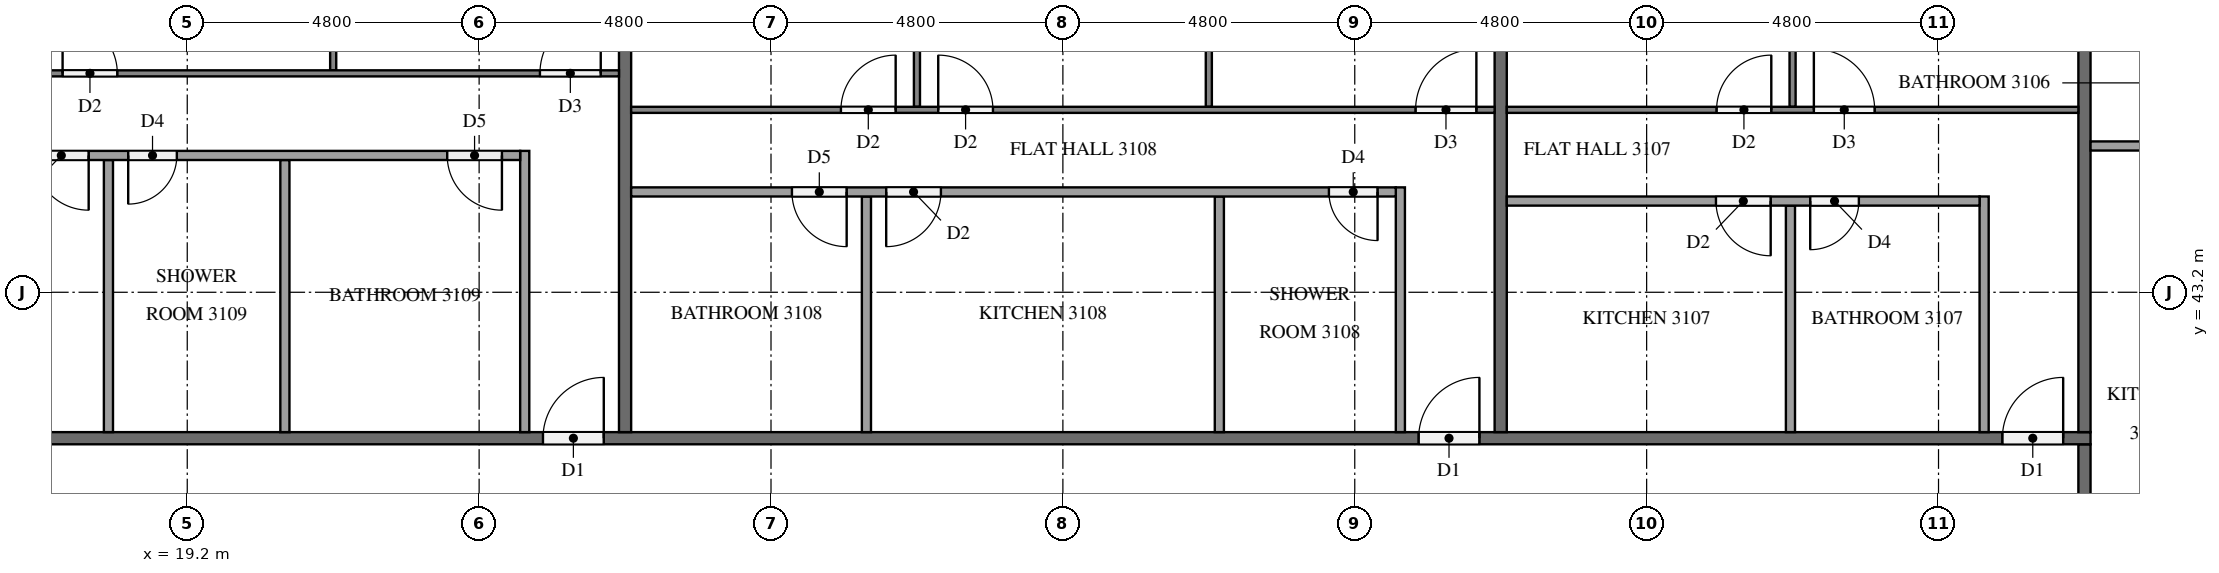
"""IFC4 building model, lengths in metres.
Left out: names, types, materials, properties, quantities, classifications, styles, units other than length and angle.
Written with IfcOpenShell. Run it as: python <this file> out.ifc"""

import sys

from ifc_helpers import new_model, si_unit, direction, frame, frame_2d, origin, place, context, subcontext, project, spatial, rectangle, extrude, element, fill, save


model = new_model("IFC4")
c1 = context("Model", 3, precision=1e-05, world=origin(), true_north=direction((0.0, 1.0)))
c2 = subcontext(c1, "Body", "Model", "MODEL_VIEW")
j1 = project(units=[si_unit("LENGTHUNIT", "METRE"), si_unit("PLANEANGLEUNIT", "RADIAN")], contexts=[c1])
p1 = place(None, origin())
s1 = spatial("IfcSite", under=j1, at=p1, CompositionType="ELEMENT")
p2 = place(p1, origin())
s2 = spatial("IfcBuilding", under=s1, at=p2, CompositionType="ELEMENT")
p3 = place(p2, frame((0.0, 0.0, 122.6)))
s3 = spatial("IfcBuildingStorey", under=s2, at=p3, CompositionType="ELEMENT", Elevation=122.6)
p4 = place(p3, frame((50.4, 40.7, 0.0), z_axis=(0.0, 0.0, 1.0), x_axis=(0.0, -1.0, 0.0)))
e1 = element("IfcWall", 1, at=p4, inside=s3, PredefinedType="PARTITIONING", context=c2, shape_type="SweptSolid", body=[
    extrude(rectangle(XDim=2.8, YDim=0.2, at=frame_2d((1.4, 0.0))), origin(), (0.0, 0.0, 1.0), 3.2),
])
p5 = place(p4, frame((1.55, 0.0, 0.0)))
e2 = element("IfcOpeningElement", 2, at=p5, cuts=e1, PredefinedType="OPENING", context=c2, shape_type="SweptSolid", body=[
    extrude(rectangle(XDim=1.0, YDim=2.1, at=frame_2d((0.5, 1.05))), frame((0.0, 0.11, 0.0), z_axis=(0.0, -1.0, 0.0), x_axis=(1.0, 0.0, 0.0)), (0.0, 0.0, 1.0), 0.22),
])
p6 = place(p3, frame((11.9, 40.8, 0.0), z_axis=(0.0, 0.0, 1.0), x_axis=(1.0, 0.0, 0.0)))
e3 = element("IfcWall", 3, at=p6, inside=s3, PredefinedType="PARTITIONING", context=c2, shape_type="SweptSolid", body=[
    extrude(rectangle(XDim=38.6, YDim=0.2, at=frame_2d((19.3, 0.0))), origin(), (0.0, 0.0, 1.0), 3.2),
])
p7 = place(p6, frame((37.15, 0.0, 0.0)))
e4 = element("IfcOpeningElement", 4, at=p7, cuts=e3, PredefinedType="OPENING", context=c2, shape_type="SweptSolid", body=[
    extrude(rectangle(XDim=1.0, YDim=2.1, at=frame_2d((0.5, 1.05))), frame((0.0, 0.11, 0.0), z_axis=(0.0, -1.0, 0.0), x_axis=(1.0, 0.0, 0.0)), (0.0, 0.0, 1.0), 0.22),
])
p8 = place(p6, frame((27.55, 0.0, 0.0)))
e5 = element("IfcOpeningElement", 5, at=p8, cuts=e3, PredefinedType="OPENING", context=c2, shape_type="SweptSolid", body=[
    extrude(rectangle(XDim=1.0, YDim=2.1, at=frame_2d((0.5, 1.05))), frame((0.0, 0.11, 0.0), z_axis=(0.0, -1.0, 0.0), x_axis=(1.0, 0.0, 0.0)), (0.0, 0.0, 1.0), 0.22),
])
p9 = place(p6, frame((13.15, 0.0, 0.0)))
e6 = element("IfcOpeningElement", 6, at=p9, cuts=e3, PredefinedType="OPENING", context=c2, shape_type="SweptSolid", body=[
    extrude(rectangle(XDim=1.0, YDim=2.1, at=frame_2d((0.5, 1.05))), frame((0.0, 0.11, 0.0), z_axis=(0.0, -1.0, 0.0), x_axis=(1.0, 0.0, 0.0)), (0.0, 0.0, 1.0), 0.22),
])
for number, where, z_axis, x_axis in (
    (7, (50.4, 40.9, 0.0), (0.0, 0.0, 1.0), (0.0, 1.0, 0.0)),
    (8, (40.8, 52.7, 0.0), (0.0, 0.0, 1.0), (0.0, -1.0, 0.0)),
    (9, (26.4, 52.7, 0.0), (0.0, 0.0, 1.0), (0.0, -1.0, 0.0)),
):
    element("IfcWall", number, at=place(p3, frame(where, z_axis=z_axis, x_axis=x_axis)), inside=s3, PredefinedType="PARTITIONING", context=c2, shape_type="SweptSolid", body=[
        extrude(rectangle(XDim=11.8, YDim=0.2, at=frame_2d((5.9, 0.0))), origin(), (0.0, 0.0, 1.0), 3.2),
    ])
p10 = place(p3, frame((50.5, 45.606, 0.0), z_axis=(0.0, 0.0, 1.0), x_axis=(1.0, 0.0, 0.0)))
e10 = element("IfcWall", 10, at=p10, inside=s3, PredefinedType="PARTITIONING", context=c2, shape_type="SweptSolid", body=[
    extrude(rectangle(XDim=1.925, YDim=0.15, at=frame_2d((0.962, 0.0))), origin(), (0.0, 0.0, 1.0), 3.2),
])
p11 = place(p3, frame((45.6, 46.25, 0.0), z_axis=(0.0, 0.0, 1.0), x_axis=(0.0, 1.0, 0.0)))
e11 = element("IfcWall", 11, at=p11, inside=s3, PredefinedType="PARTITIONING", context=c2, shape_type="SweptSolid", body=[
    extrude(rectangle(XDim=6.45, YDim=0.1, at=frame_2d((3.225, 0.0))), origin(), (0.0, 0.0, 1.0), 3.2),
])
p12 = place(p3, frame((40.9, 46.2, 0.0), z_axis=(0.0, 0.0, 1.0), x_axis=(1.0, 0.0, 0.0)))
e12 = element("IfcWall", 12, at=p12, inside=s3, PredefinedType="PARTITIONING", context=c2, shape_type="SweptSolid", body=[
    extrude(rectangle(XDim=9.4, YDim=0.1, at=frame_2d((4.7, 0.0))), origin(), (0.0, 0.0, 1.0), 3.2),
])
p13 = place(p12, frame((5.05, 0.0, 0.0)))
e13 = element("IfcOpeningElement", 13, at=p13, cuts=e12, PredefinedType="OPENING", context=c2, shape_type="SweptSolid", body=[
    extrude(rectangle(XDim=1.0, YDim=2.1, at=frame_2d((0.5, 1.05))), frame((0.0, 0.06, 0.0), z_axis=(0.0, -1.0, 0.0), x_axis=(1.0, 0.0, 0.0)), (0.0, 0.0, 1.0), 0.12),
])
p14 = place(p12, frame((3.45, 0.0, 0.0)))
e14 = element("IfcOpeningElement", 14, at=p14, cuts=e12, PredefinedType="OPENING", context=c2, shape_type="SweptSolid", body=[
    extrude(rectangle(XDim=0.9, YDim=2.1, at=frame_2d((0.45, 1.05))), frame((0.0, 0.06, 0.0), z_axis=(0.0, -1.0, 0.0), x_axis=(1.0, 0.0, 0.0)), (0.0, 0.0, 1.0), 0.12),
])
p15 = place(p3, frame((45.565, 40.9, 0.0), z_axis=(0.0, 0.0, 1.0), x_axis=(0.0, 1.0, 0.0)))
e15 = element("IfcWall", 15, at=p15, inside=s3, PredefinedType="PARTITIONING", context=c2, shape_type="SweptSolid", body=[
    extrude(rectangle(XDim=3.725, YDim=0.15, at=frame_2d((1.863, 0.0))), origin(), (0.0, 0.0, 1.0), 3.2),
])
p16 = place(p3, frame((48.75, 40.9, 0.0), z_axis=(0.0, 0.0, 1.0), x_axis=(0.0, 1.0, 0.0)))
e16 = element("IfcWall", 16, at=p16, inside=s3, PredefinedType="PARTITIONING", context=c2, shape_type="SweptSolid", body=[
    extrude(rectangle(XDim=3.875, YDim=0.15, at=frame_2d((1.938, 0.0))), origin(), (0.0, 0.0, 1.0), 3.2),
])
p17 = place(p3, frame((48.675, 44.7, 0.0), z_axis=(0.0, 0.0, 1.0), x_axis=(-1.0, 0.0, 0.0)))
e17 = element("IfcWall", 17, at=p17, inside=s3, PredefinedType="PARTITIONING", context=c2, shape_type="SweptSolid", body=[
    extrude(rectangle(XDim=7.775, YDim=0.15, at=frame_2d((3.888, 0.0))), origin(), (0.0, 0.0, 1.0), 3.2),
])
p18 = place(p17, frame((1.985, 0.0, 0.0)))
e18 = element("IfcOpeningElement", 18, at=p18, cuts=e17, PredefinedType="OPENING", context=c2, shape_type="SweptSolid", body=[
    extrude(rectangle(XDim=0.8, YDim=2.1, at=frame_2d((0.4, 1.05))), frame((0.0, 0.085, 0.0), z_axis=(0.0, -1.0, 0.0), x_axis=(1.0, 0.0, 0.0)), (0.0, 0.0, 1.0), 0.17),
])
p19 = place(p17, frame((3.435, 0.0, 0.0)))
e19 = element("IfcOpeningElement", 19, at=p19, cuts=e17, PredefinedType="OPENING", context=c2, shape_type="SweptSolid", body=[
    extrude(rectangle(XDim=0.9, YDim=2.1, at=frame_2d((0.45, 1.05))), frame((0.0, 0.085, 0.0), z_axis=(0.0, -1.0, 0.0), x_axis=(1.0, 0.0, 0.0)), (0.0, 0.0, 1.0), 0.17),
])
for number, where, z_axis, x_axis in (
    (20, (36.0, 46.25, 0.0), (0.0, 0.0, 1.0), (0.0, 1.0, 0.0)),
    (21, (31.2, 46.25, 0.0), (0.0, 0.0, 1.0), (0.0, 1.0, 0.0)),
):
    element("IfcWall", number, at=place(p3, frame(where, z_axis=z_axis, x_axis=x_axis)), inside=s3, PredefinedType="PARTITIONING", context=c2, shape_type="SweptSolid", body=[
        extrude(rectangle(XDim=6.45, YDim=0.1, at=frame_2d((3.225, 0.0))), origin(), (0.0, 0.0, 1.0), 3.2),
    ])
p20 = place(p3, frame((26.5, 46.2, 0.0), z_axis=(0.0, 0.0, 1.0), x_axis=(1.0, 0.0, 0.0)))
e22 = element("IfcWall", 22, at=p20, inside=s3, PredefinedType="PARTITIONING", context=c2, shape_type="SweptSolid", body=[
    extrude(rectangle(XDim=14.2, YDim=0.1, at=frame_2d((7.1, 0.0))), origin(), (0.0, 0.0, 1.0), 3.2),
])
p21 = place(p20, frame((12.9, 0.0, 0.0)))
e23 = element("IfcOpeningElement", 23, at=p21, cuts=e22, PredefinedType="OPENING", context=c2, shape_type="SweptSolid", body=[
    extrude(rectangle(XDim=1.0, YDim=2.1, at=frame_2d((0.5, 1.05))), frame((0.0, 0.06, 0.0), z_axis=(0.0, -1.0, 0.0), x_axis=(1.0, 0.0, 0.0)), (0.0, 0.0, 1.0), 0.12),
])
p22 = place(p20, frame((5.05, 0.0, 0.0)))
e24 = element("IfcOpeningElement", 24, at=p22, cuts=e22, PredefinedType="OPENING", context=c2, shape_type="SweptSolid", body=[
    extrude(rectangle(XDim=0.9, YDim=2.1, at=frame_2d((0.45, 1.05))), frame((0.0, 0.06, 0.0), z_axis=(0.0, -1.0, 0.0), x_axis=(1.0, 0.0, 0.0)), (0.0, 0.0, 1.0), 0.12),
])
p23 = place(p20, frame((3.45, 0.0, 0.0)))
e25 = element("IfcOpeningElement", 25, at=p23, cuts=e22, PredefinedType="OPENING", context=c2, shape_type="SweptSolid", body=[
    extrude(rectangle(XDim=0.9, YDim=2.1, at=frame_2d((0.45, 1.05))), frame((0.0, 0.06, 0.0), z_axis=(0.0, -1.0, 0.0), x_axis=(1.0, 0.0, 0.0)), (0.0, 0.0, 1.0), 0.12),
])
for number, where, z_axis, x_axis in (
    (26, (36.173, 40.9, 0.0), (0.0, 0.0, 1.0), (0.0, 1.0, 0.0)),
    (27, (30.369, 40.9, 0.0), (0.0, 0.0, 1.0), (0.0, 1.0, 0.0)),
):
    element("IfcWall", number, at=place(p3, frame(where, z_axis=z_axis, x_axis=x_axis)), inside=s3, PredefinedType="PARTITIONING", context=c2, shape_type="SweptSolid", body=[
        extrude(rectangle(XDim=3.875, YDim=0.15, at=frame_2d((1.938, 0.0))), origin(), (0.0, 0.0, 1.0), 3.2),
    ])
p24 = place(p3, frame((39.15, 40.9, 0.0), z_axis=(0.0, 0.0, 1.0), x_axis=(0.0, 1.0, 0.0)))
e28 = element("IfcWall", 28, at=p24, inside=s3, PredefinedType="PARTITIONING", context=c2, shape_type="SweptSolid", body=[
    extrude(rectangle(XDim=4.025, YDim=0.15, at=frame_2d((2.013, 0.0))), origin(), (0.0, 0.0, 1.0), 3.2),
])
p25 = place(p3, frame((39.075, 44.85, 0.0), z_axis=(0.0, 0.0, 1.0), x_axis=(-1.0, 0.0, 0.0)))
e29 = element("IfcWall", 29, at=p25, inside=s3, PredefinedType="PARTITIONING", context=c2, shape_type="SweptSolid", body=[
    extrude(rectangle(XDim=12.575, YDim=0.15, at=frame_2d((6.288, 0.0))), origin(), (0.0, 0.0, 1.0), 3.2),
])
p26 = place(p25, frame((0.3, 0.0, 0.0)))
e30 = element("IfcOpeningElement", 30, at=p26, cuts=e29, PredefinedType="OPENING", context=c2, shape_type="SweptSolid", body=[
    extrude(rectangle(XDim=0.8, YDim=2.1, at=frame_2d((0.4, 1.05))), frame((0.0, 0.085, 0.0), z_axis=(0.0, -1.0, 0.0), x_axis=(1.0, 0.0, 0.0)), (0.0, 0.0, 1.0), 0.17),
])
p27 = place(p25, frame((7.481, 0.0, 0.0)))
e31 = element("IfcOpeningElement", 31, at=p27, cuts=e29, PredefinedType="OPENING", context=c2, shape_type="SweptSolid", body=[
    extrude(rectangle(XDim=0.9, YDim=2.1, at=frame_2d((0.45, 1.05))), frame((0.0, 0.085, 0.0), z_axis=(0.0, -1.0, 0.0), x_axis=(1.0, 0.0, 0.0)), (0.0, 0.0, 1.0), 0.17),
])
p28 = place(p25, frame((9.031, 0.0, 0.0)))
e32 = element("IfcOpeningElement", 32, at=p28, cuts=e29, PredefinedType="OPENING", context=c2, shape_type="SweptSolid", body=[
    extrude(rectangle(XDim=0.9, YDim=2.1, at=frame_2d((0.45, 1.05))), frame((0.0, 0.085, 0.0), z_axis=(0.0, -1.0, 0.0), x_axis=(1.0, 0.0, 0.0)), (0.0, 0.0, 1.0), 0.17),
])
p29 = place(p3, frame((21.6, 46.85, 0.0), z_axis=(0.0, 0.0, 1.0), x_axis=(0.0, 1.0, 0.0)))
e33 = element("IfcWall", 33, at=p29, inside=s3, PredefinedType="PARTITIONING", context=c2, shape_type="SweptSolid", body=[
    extrude(rectangle(XDim=5.85, YDim=0.1, at=frame_2d((2.925, 0.0))), origin(), (0.0, 0.0, 1.0), 3.2),
])
p30 = place(p3, frame((12.1, 46.8, 0.0), z_axis=(0.0, 0.0, 1.0), x_axis=(1.0, 0.0, 0.0)))
e34 = element("IfcWall", 34, at=p30, inside=s3, PredefinedType="PARTITIONING", context=c2, shape_type="SweptSolid", body=[
    extrude(rectangle(XDim=14.2, YDim=0.1, at=frame_2d((7.1, 0.0))), origin(), (0.0, 0.0, 1.0), 3.2),
])
p31 = place(p30, frame((12.9, 0.0, 0.0)))
e35 = element("IfcOpeningElement", 35, at=p31, cuts=e34, PredefinedType="OPENING", context=c2, shape_type="SweptSolid", body=[
    extrude(rectangle(XDim=1.0, YDim=2.1, at=frame_2d((0.5, 1.05))), frame((0.0, 0.06, 0.0), z_axis=(0.0, -1.0, 0.0), x_axis=(1.0, 0.0, 0.0)), (0.0, 0.0, 1.0), 0.12),
])
p32 = place(p30, frame((5.05, 0.0, 0.0)))
e36 = element("IfcOpeningElement", 36, at=p32, cuts=e34, PredefinedType="OPENING", context=c2, shape_type="SweptSolid", body=[
    extrude(rectangle(XDim=0.9, YDim=2.1, at=frame_2d((0.45, 1.05))), frame((0.0, 0.06, 0.0), z_axis=(0.0, -1.0, 0.0), x_axis=(1.0, 0.0, 0.0)), (0.0, 0.0, 1.0), 0.12),
])
p33 = place(p30, frame((3.45, 0.0, 0.0)))
e37 = element("IfcOpeningElement", 37, at=p33, cuts=e34, PredefinedType="OPENING", context=c2, shape_type="SweptSolid", body=[
    extrude(rectangle(XDim=0.9, YDim=2.1, at=frame_2d((0.45, 1.05))), frame((0.0, 0.06, 0.0), z_axis=(0.0, -1.0, 0.0), x_axis=(1.0, 0.0, 0.0)), (0.0, 0.0, 1.0), 0.12),
])
for number, where, z_axis, x_axis in (
    (38, (20.806, 40.9, 0.0), (0.0, 0.0, 1.0), (0.0, 1.0, 0.0)),
    (39, (17.904, 40.9, 0.0), (0.0, 0.0, 1.0), (0.0, 1.0, 0.0)),
):
    element("IfcWall", number, at=place(p3, frame(where, z_axis=z_axis, x_axis=x_axis)), inside=s3, PredefinedType="PARTITIONING", context=c2, shape_type="SweptSolid", body=[
        extrude(rectangle(XDim=4.475, YDim=0.15, at=frame_2d((2.238, 0.0))), origin(), (0.0, 0.0, 1.0), 3.2),
    ])
p34 = place(p3, frame((24.75, 40.9, 0.0), z_axis=(0.0, 0.0, 1.0), x_axis=(0.0, 1.0, 0.0)))
e40 = element("IfcWall", 40, at=p34, inside=s3, PredefinedType="PARTITIONING", context=c2, shape_type="SweptSolid", body=[
    extrude(rectangle(XDim=4.625, YDim=0.15, at=frame_2d((2.312, 0.0))), origin(), (0.0, 0.0, 1.0), 3.2),
])
p35 = place(p3, frame((24.675, 45.45, 0.0), z_axis=(0.0, 0.0, 1.0), x_axis=(-1.0, 0.0, 0.0)))
e41 = element("IfcWall", 41, at=p35, inside=s3, PredefinedType="PARTITIONING", context=c2, shape_type="SweptSolid", body=[
    extrude(rectangle(XDim=12.575, YDim=0.15, at=frame_2d((6.288, 0.0))), origin(), (0.0, 0.0, 1.0), 3.2),
])
p36 = place(p35, frame((0.3, 0.0, 0.0)))
e42 = element("IfcOpeningElement", 42, at=p36, cuts=e41, PredefinedType="OPENING", context=c2, shape_type="SweptSolid", body=[
    extrude(rectangle(XDim=0.9, YDim=2.1, at=frame_2d((0.45, 1.05))), frame((0.0, 0.085, 0.0), z_axis=(0.0, -1.0, 0.0), x_axis=(1.0, 0.0, 0.0)), (0.0, 0.0, 1.0), 0.17),
])
p37 = place(p35, frame((5.646, 0.0, 0.0)))
e43 = element("IfcOpeningElement", 43, at=p37, cuts=e41, PredefinedType="OPENING", context=c2, shape_type="SweptSolid", body=[
    extrude(rectangle(XDim=0.8, YDim=2.1, at=frame_2d((0.4, 1.05))), frame((0.0, 0.085, 0.0), z_axis=(0.0, -1.0, 0.0), x_axis=(1.0, 0.0, 0.0)), (0.0, 0.0, 1.0), 0.17),
])
p38 = place(p35, frame((7.096, 0.0, 0.0)))
e44 = element("IfcOpeningElement", 44, at=p38, cuts=e41, PredefinedType="OPENING", context=c2, shape_type="SweptSolid", body=[
    extrude(rectangle(XDim=0.9, YDim=2.1, at=frame_2d((0.45, 1.05))), frame((0.0, 0.085, 0.0), z_axis=(0.0, -1.0, 0.0), x_axis=(1.0, 0.0, 0.0)), (0.0, 0.0, 1.0), 0.17),
])
p39 = place(p7, origin())
e45 = element("IfcDoor", 45, at=p39, inside=s3, OperationType="SINGLE_SWING_RIGHT", PredefinedType="DOOR", context=c2, shape_type="SweptSolid", body=[
    extrude(rectangle(XDim=1.0, YDim=2.1, at=frame_2d((0.5, 1.05))), frame((0.0, 0.025, 0.0), z_axis=(0.0, -1.0, 0.0), x_axis=(1.0, 0.0, 0.0)), (0.0, 0.0, 1.0), 0.05),
])
fill(e4, e45)
p40 = place(p8, origin())
e46 = element("IfcDoor", 46, at=p40, inside=s3, OperationType="SINGLE_SWING_RIGHT", PredefinedType="DOOR", context=c2, shape_type="SweptSolid", body=[
    extrude(rectangle(XDim=1.0, YDim=2.1, at=frame_2d((0.5, 1.05))), frame((0.0, 0.025, 0.0), z_axis=(0.0, -1.0, 0.0), x_axis=(1.0, 0.0, 0.0)), (0.0, 0.0, 1.0), 0.05),
])
fill(e5, e46)
p41 = place(p9, origin())
e47 = element("IfcDoor", 47, at=p41, inside=s3, OperationType="SINGLE_SWING_RIGHT", PredefinedType="DOOR", context=c2, shape_type="SweptSolid", body=[
    extrude(rectangle(XDim=1.0, YDim=2.1, at=frame_2d((0.5, 1.05))), frame((0.0, 0.025, 0.0), z_axis=(0.0, -1.0, 0.0), x_axis=(1.0, 0.0, 0.0)), (0.0, 0.0, 1.0), 0.05),
])
fill(e6, e47)
p42 = place(p13, origin())
e48 = element("IfcDoor", 48, at=p42, inside=s3, OperationType="SINGLE_SWING_LEFT", PredefinedType="DOOR", context=c2, shape_type="SweptSolid", body=[
    extrude(rectangle(XDim=1.0, YDim=2.1, at=frame_2d((0.5, 1.05))), frame((0.0, 0.025, 0.0), z_axis=(0.0, -1.0, 0.0), x_axis=(1.0, 0.0, 0.0)), (0.0, 0.0, 1.0), 0.05),
])
fill(e13, e48)
p43 = place(p14, origin())
e49 = element("IfcDoor", 49, at=p43, inside=s3, OperationType="SINGLE_SWING_RIGHT", PredefinedType="DOOR", context=c2, shape_type="SweptSolid", body=[
    extrude(rectangle(XDim=0.9, YDim=2.1, at=frame_2d((0.45, 1.05))), frame((0.0, 0.025, 0.0), z_axis=(0.0, -1.0, 0.0), x_axis=(1.0, 0.0, 0.0)), (0.0, 0.0, 1.0), 0.05),
])
fill(e14, e49)
p44 = place(p18, origin())
e50 = element("IfcDoor", 50, at=p44, inside=s3, OperationType="SINGLE_SWING_RIGHT", PredefinedType="DOOR", context=c2, shape_type="SweptSolid", body=[
    extrude(rectangle(XDim=0.8, YDim=2.1, at=frame_2d((0.4, 1.05))), frame((0.0, 0.025, 0.0), z_axis=(0.0, -1.0, 0.0), x_axis=(1.0, 0.0, 0.0)), (0.0, 0.0, 1.0), 0.05),
])
fill(e18, e50)
p45 = place(p19, origin())
e51 = element("IfcDoor", 51, at=p45, inside=s3, OperationType="SINGLE_SWING_LEFT", PredefinedType="DOOR", context=c2, shape_type="SweptSolid", body=[
    extrude(rectangle(XDim=0.9, YDim=2.1, at=frame_2d((0.45, 1.05))), frame((0.0, 0.025, 0.0), z_axis=(0.0, -1.0, 0.0), x_axis=(1.0, 0.0, 0.0)), (0.0, 0.0, 1.0), 0.05),
])
fill(e19, e51)
p46 = place(p21, origin())
e52 = element("IfcDoor", 52, at=p46, inside=s3, OperationType="SINGLE_SWING_RIGHT", PredefinedType="DOOR", context=c2, shape_type="SweptSolid", body=[
    extrude(rectangle(XDim=1.0, YDim=2.1, at=frame_2d((0.5, 1.05))), frame((0.0, 0.025, 0.0), z_axis=(0.0, -1.0, 0.0), x_axis=(1.0, 0.0, 0.0)), (0.0, 0.0, 1.0), 0.05),
])
fill(e23, e52)
p47 = place(p22, origin())
e53 = element("IfcDoor", 53, at=p47, inside=s3, OperationType="SINGLE_SWING_LEFT", PredefinedType="DOOR", context=c2, shape_type="SweptSolid", body=[
    extrude(rectangle(XDim=0.9, YDim=2.1, at=frame_2d((0.45, 1.05))), frame((0.0, 0.025, 0.0), z_axis=(0.0, -1.0, 0.0), x_axis=(1.0, 0.0, 0.0)), (0.0, 0.0, 1.0), 0.05),
])
fill(e24, e53)
p48 = place(p23, origin())
e54 = element("IfcDoor", 54, at=p48, inside=s3, OperationType="SINGLE_SWING_RIGHT", PredefinedType="DOOR", context=c2, shape_type="SweptSolid", body=[
    extrude(rectangle(XDim=0.9, YDim=2.1, at=frame_2d((0.45, 1.05))), frame((0.0, 0.025, 0.0), z_axis=(0.0, -1.0, 0.0), x_axis=(1.0, 0.0, 0.0)), (0.0, 0.0, 1.0), 0.05),
])
fill(e25, e54)
p49 = place(p26, origin())
e55 = element("IfcDoor", 55, at=p49, inside=s3, OperationType="SINGLE_SWING_LEFT", PredefinedType="DOOR", context=c2, shape_type="SweptSolid", body=[
    extrude(rectangle(XDim=0.8, YDim=2.1, at=frame_2d((0.4, 1.05))), frame((0.0, 0.025, 0.0), z_axis=(0.0, -1.0, 0.0), x_axis=(1.0, 0.0, 0.0)), (0.0, 0.0, 1.0), 0.05),
])
fill(e30, e55)
p50 = place(p27, origin())
e56 = element("IfcDoor", 56, at=p50, inside=s3, OperationType="SINGLE_SWING_RIGHT", PredefinedType="DOOR", context=c2, shape_type="SweptSolid", body=[
    extrude(rectangle(XDim=0.9, YDim=2.1, at=frame_2d((0.45, 1.05))), frame((0.0, 0.025, 0.0), z_axis=(0.0, -1.0, 0.0), x_axis=(1.0, 0.0, 0.0)), (0.0, 0.0, 1.0), 0.05),
])
fill(e31, e56)
p51 = place(p28, origin())
e57 = element("IfcDoor", 57, at=p51, inside=s3, OperationType="SINGLE_SWING_LEFT", PredefinedType="DOOR", context=c2, shape_type="SweptSolid", body=[
    extrude(rectangle(XDim=0.9, YDim=2.1, at=frame_2d((0.45, 1.05))), frame((0.0, 0.025, 0.0), z_axis=(0.0, -1.0, 0.0), x_axis=(1.0, 0.0, 0.0)), (0.0, 0.0, 1.0), 0.05),
])
fill(e32, e57)
p52 = place(p31, origin())
e58 = element("IfcDoor", 58, at=p52, inside=s3, OperationType="SINGLE_SWING_RIGHT", PredefinedType="DOOR", context=c2, shape_type="SweptSolid", body=[
    extrude(rectangle(XDim=1.0, YDim=2.1, at=frame_2d((0.5, 1.05))), frame((0.0, 0.025, 0.0), z_axis=(0.0, -1.0, 0.0), x_axis=(1.0, 0.0, 0.0)), (0.0, 0.0, 1.0), 0.05),
])
fill(e35, e58)
p53 = place(p32, origin())
e59 = element("IfcDoor", 59, at=p53, inside=s3, OperationType="SINGLE_SWING_LEFT", PredefinedType="DOOR", context=c2, shape_type="SweptSolid", body=[
    extrude(rectangle(XDim=0.9, YDim=2.1, at=frame_2d((0.45, 1.05))), frame((0.0, 0.025, 0.0), z_axis=(0.0, -1.0, 0.0), x_axis=(1.0, 0.0, 0.0)), (0.0, 0.0, 1.0), 0.05),
])
fill(e36, e59)
p54 = place(p36, origin())
e60 = element("IfcDoor", 60, at=p54, inside=s3, OperationType="SINGLE_SWING_LEFT", PredefinedType="DOOR", context=c2, shape_type="SweptSolid", body=[
    extrude(rectangle(XDim=0.9, YDim=2.1, at=frame_2d((0.45, 1.05))), frame((0.0, 0.025, 0.0), z_axis=(0.0, -1.0, 0.0), x_axis=(1.0, 0.0, 0.0)), (0.0, 0.0, 1.0), 0.05),
])
fill(e42, e60)
p55 = place(p37, origin())
e61 = element("IfcDoor", 61, at=p55, inside=s3, OperationType="SINGLE_SWING_RIGHT", PredefinedType="DOOR", context=c2, shape_type="SweptSolid", body=[
    extrude(rectangle(XDim=0.8, YDim=2.1, at=frame_2d((0.4, 1.05))), frame((0.0, 0.025, 0.0), z_axis=(0.0, -1.0, 0.0), x_axis=(1.0, 0.0, 0.0)), (0.0, 0.0, 1.0), 0.05),
])
fill(e43, e61)
p56 = place(p38, origin())
e62 = element("IfcDoor", 62, at=p56, inside=s3, OperationType="SINGLE_SWING_LEFT", PredefinedType="DOOR", context=c2, shape_type="SweptSolid", body=[
    extrude(rectangle(XDim=0.9, YDim=2.1, at=frame_2d((0.45, 1.05))), frame((0.0, 0.025, 0.0), z_axis=(0.0, -1.0, 0.0), x_axis=(1.0, 0.0, 0.0)), (0.0, 0.0, 1.0), 0.05),
])
fill(e44, e62)
save(model, sys.argv[1])
